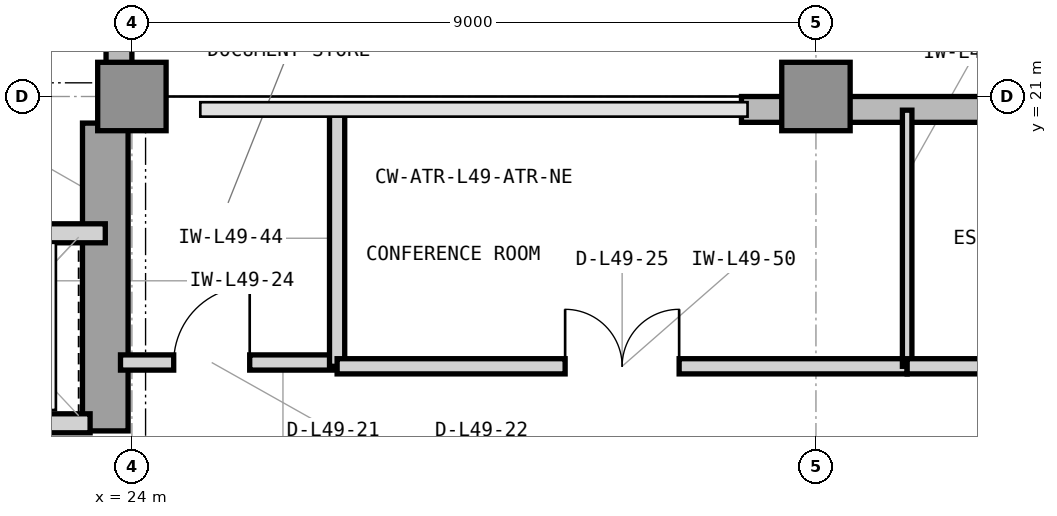
"""IFC4 building model, lengths in metres.
Left out: names, types, materials, properties, quantities, classifications, styles, units other than length and angle.
Written with IfcOpenShell. Run it as: python <this file> out.ifc"""

import sys

from ifc_helpers import new_model, si_unit, direction, frame, frame_2d, origin, origin_2d, place, context, subcontext, project, spatial, rectangle, extrude, element, fill, save


model = new_model("IFC4")
c1 = context("Model", 3, precision=1e-05, world=origin(), true_north=direction((0.0, 1.0)))
c2 = subcontext(c1, "Body", "Model", "MODEL_VIEW")
j1 = project(units=[si_unit("LENGTHUNIT", "METRE"), si_unit("PLANEANGLEUNIT", "RADIAN")], contexts=[c1])
p1 = place(None, origin())
s1 = spatial("IfcSite", under=j1, at=p1, CompositionType="ELEMENT")
p2 = place(p1, origin())
s2 = spatial("IfcBuilding", under=s1, at=p2, CompositionType="ELEMENT")
p3 = place(p2, frame((0.0, 0.0, 203.4)))
s3 = spatial("IfcBuildingStorey", under=s2, at=p3, CompositionType="ELEMENT", Elevation=203.4)
p4 = place(p3, frame((23.65, 16.6, 0.0), z_axis=(0.0, 0.0, 1.0), x_axis=(0.0, 1.0, 0.0)))
e1 = element("IfcWall", 1, at=p4, inside=s3, PredefinedType="SHEAR", context=c2, shape_type="SweptSolid", body=[
    extrude(rectangle(XDim=4.05, YDim=0.6, at=frame_2d((2.025, 0.0))), origin(), (0.0, 0.0, 1.0), 3.9),
])
for number, where, z_axis, x_axis in (
    (2, (24.0, 21.0, 0.0), (0.0, 0.0, 1.0), (1.0, 0.0, 0.0)),
    (3, (33.0, 21.0, 0.0), (0.0, 0.0, 1.0), (1.0, 0.0, 0.0)),
):
    element("IfcColumn", number, at=place(p3, frame(where, z_axis=z_axis, x_axis=x_axis)), inside=s3, PredefinedType="COLUMN", context=c2, shape_type="SweptSolid", body=[
        extrude(rectangle(XDim=0.9, YDim=0.9, at=origin_2d()), origin(), (0.0, 0.0, 1.0), 3.9),
    ])
p5 = place(p3, frame((55.4, 20.83, 0.0), z_axis=(0.0, 0.0, 1.0), x_axis=(-1.0, 0.0, 0.0)))
e4 = element("IfcWall", 4, at=p5, inside=s3, PredefinedType="STANDARD", context=c2, shape_type="SweptSolid", body=[
    extrude(rectangle(XDim=23.38, YDim=0.34, at=frame_2d((11.69, 0.0))), origin(), (0.0, 0.0, 1.0), 3.7),
])
p6 = place(p5, frame((15.216, 0.0, 0.9)))
e5 = element("IfcOpeningElement", 5, at=p6, cuts=e4, PredefinedType="OPENING", context=c2, shape_type="SweptSolid", body=[
    extrude(rectangle(XDim=2.3, YDim=2.2, at=frame_2d((1.15, 1.1))), frame((0.0, 0.18, 0.0), z_axis=(0.0, -1.0, 0.0), x_axis=(1.0, 0.0, 0.0)), (0.0, 0.0, 1.0), 0.36),
])
p7 = place(p5, frame((8.375, 0.0, 0.9)))
e6 = element("IfcOpeningElement", 6, at=p7, cuts=e4, PredefinedType="OPENING", context=c2, shape_type="SweptSolid", body=[
    extrude(rectangle(XDim=2.3, YDim=2.2, at=frame_2d((1.15, 1.1))), frame((0.0, 0.18, 0.0), z_axis=(0.0, -1.0, 0.0), x_axis=(1.0, 0.0, 0.0)), (0.0, 0.0, 1.0), 0.36),
])
p8 = place(p3, frame((23.83, 21.0, 0.0), z_axis=(0.0, 0.0, 1.0), x_axis=(0.0, 1.0, 0.0)))
e7 = element("IfcWall", 7, at=p8, inside=s3, PredefinedType="STANDARD", context=c2, shape_type="SweptSolid", body=[
    extrude(rectangle(XDim=19.4, YDim=0.34, at=frame_2d((9.7, 0.0))), origin(), (0.0, 0.0, 1.0), 3.7),
])
p9 = place(p3, frame((21.05, 16.7, 0.0), z_axis=(0.0, 0.0, 1.0), x_axis=(1.0, 0.0, 0.0)))
e8 = element("IfcWall", 8, at=p9, inside=s3, PredefinedType="PARTITIONING", context=c2, shape_type="SweptSolid", body=[
    extrude(rectangle(XDim=2.4, YDim=0.25, at=frame_2d((1.2, 0.0))), origin(), (0.0, 0.0, 1.0), 3.283),
])
p10 = place(p9, frame((0.52, 0.0, 0.0)))
e9 = element("IfcOpeningElement", 9, at=p10, cuts=e8, PredefinedType="OPENING", context=c2, shape_type="SweptSolid", body=[
    extrude(rectangle(XDim=1.15, YDim=2.25, at=frame_2d((0.575, 1.125))), frame((0.0, 0.135, 0.0), z_axis=(0.0, -1.0, 0.0), x_axis=(1.0, 0.0, 0.0)), (0.0, 0.0, 1.0), 0.27),
])
p11 = place(p3, frame((16.45, 19.2, 0.0), z_axis=(0.0, 0.0, 1.0), x_axis=(1.0, 0.0, 0.0)))
e10 = element("IfcWall", 10, at=p11, inside=s3, PredefinedType="PARTITIONING", context=c2, shape_type="SweptSolid", body=[
    extrude(rectangle(XDim=7.2, YDim=0.25, at=frame_2d((3.6, 0.0))), origin(), (0.0, 0.0, 1.0), 3.69),
])
p12 = place(p3, frame((23.85, 17.5, 0.0), z_axis=(0.0, 0.0, 1.0), x_axis=(1.0, 0.0, 0.0)))
e11 = element("IfcWall", 11, at=p12, inside=s3, PredefinedType="PARTITIONING", context=c2, shape_type="SweptSolid", body=[
    extrude(rectangle(XDim=2.85, YDim=0.2, at=frame_2d((1.425, 0.0))), origin(), (0.0, 0.0, 1.0), 3.69),
])
p13 = place(p12, frame((0.7, 0.0, 0.0)))
e12 = element("IfcOpeningElement", 12, at=p13, cuts=e11, PredefinedType="OPENING", context=c2, shape_type="SweptSolid", body=[
    extrude(rectangle(XDim=1.0, YDim=2.15, at=frame_2d((0.5, 1.075))), frame((0.0, 0.11, 0.0), z_axis=(0.0, -1.0, 0.0), x_axis=(1.0, 0.0, 0.0)), (0.0, 0.0, 1.0), 0.22),
])
p14 = place(p3, frame((26.7, 17.45, 0.0), z_axis=(0.0, 0.0, 1.0), x_axis=(0.0, 1.0, 0.0)))
e13 = element("IfcWall", 13, at=p14, inside=s3, PredefinedType="PARTITIONING", context=c2, shape_type="SweptSolid", body=[
    extrude(rectangle(XDim=3.37, YDim=0.2, at=frame_2d((1.685, 0.0))), origin(), (0.0, 0.0, 1.0), 3.69),
])
p15 = place(p3, frame((26.7, 17.45, 0.0), z_axis=(0.0, 0.0, 1.0), x_axis=(1.0, 0.0, 0.0)))
e14 = element("IfcWall", 14, at=p15, inside=s3, PredefinedType="PARTITIONING", context=c2, shape_type="SweptSolid", body=[
    extrude(rectangle(XDim=7.5, YDim=0.2, at=frame_2d((3.75, 0.0))), origin(), (0.0, 0.0, 1.0), 3.69),
])
p16 = place(p15, frame((3.0, 0.0, 0.0)))
e15 = element("IfcOpeningElement", 15, at=p16, cuts=e14, PredefinedType="OPENING", context=c2, shape_type="SweptSolid", body=[
    extrude(rectangle(XDim=1.5, YDim=2.3, at=frame_2d((0.75, 1.15))), frame((0.0, 0.11, 0.0), z_axis=(0.0, -1.0, 0.0), x_axis=(1.0, 0.0, 0.0)), (0.0, 0.0, 1.0), 0.22),
])
p17 = place(p3, frame((34.2, 17.45, 0.0), z_axis=(0.0, 0.0, 1.0), x_axis=(0.0, 1.0, 0.0)))
e16 = element("IfcWall", 16, at=p17, inside=s3, PredefinedType="PARTITIONING", context=c2, shape_type="SweptSolid", body=[
    extrude(rectangle(XDim=3.37, YDim=0.125, at=frame_2d((1.685, 0.0))), origin(), (0.0, 0.0, 1.0), 3.69),
])
p18 = place(p3, frame((34.2, 17.45, 0.0), z_axis=(0.0, 0.0, 1.0), x_axis=(1.0, 0.0, 0.0)))
e17 = element("IfcWall", 17, at=p18, inside=s3, PredefinedType="PARTITIONING", context=c2, shape_type="SweptSolid", body=[
    extrude(rectangle(XDim=7.5, YDim=0.2, at=frame_2d((3.75, 0.0))), origin(), (0.0, 0.0, 1.0), 3.69),
])
p19 = place(p18, frame((3.25, 0.0, 0.0)))
e18 = element("IfcOpeningElement", 18, at=p19, cuts=e17, PredefinedType="OPENING", context=c2, shape_type="SweptSolid", body=[
    extrude(rectangle(XDim=1.0, YDim=2.15, at=frame_2d((0.5, 1.075))), frame((0.0, 0.11, 0.0), z_axis=(0.0, -1.0, 0.0), x_axis=(1.0, 0.0, 0.0)), (0.0, 0.0, 1.0), 0.22),
])
p20 = place(p13, origin())
e19 = element("IfcDoor", 19, at=p20, inside=s3, OperationType="SINGLE_SWING_RIGHT", PredefinedType="DOOR", context=c2, shape_type="SweptSolid", body=[
    extrude(rectangle(XDim=1.0, YDim=2.15, at=frame_2d((0.5, 1.075))), frame((0.0, 0.025, 0.0), z_axis=(0.0, -1.0, 0.0), x_axis=(1.0, 0.0, 0.0)), (0.0, 0.0, 1.0), 0.05),
])
fill(e12, e19)
p21 = place(p16, origin())
e20 = element("IfcDoor", 20, at=p21, inside=s3, OperationType="DOUBLE_DOOR_SINGLE_SWING", PredefinedType="DOOR", context=c2, shape_type="SweptSolid", body=[
    extrude(rectangle(XDim=1.5, YDim=2.3, at=frame_2d((0.75, 1.15))), frame((0.0, 0.025, 0.0), z_axis=(0.0, -1.0, 0.0), x_axis=(1.0, 0.0, 0.0)), (0.0, 0.0, 1.0), 0.05),
])
fill(e15, e20)
save(model, sys.argv[1])
